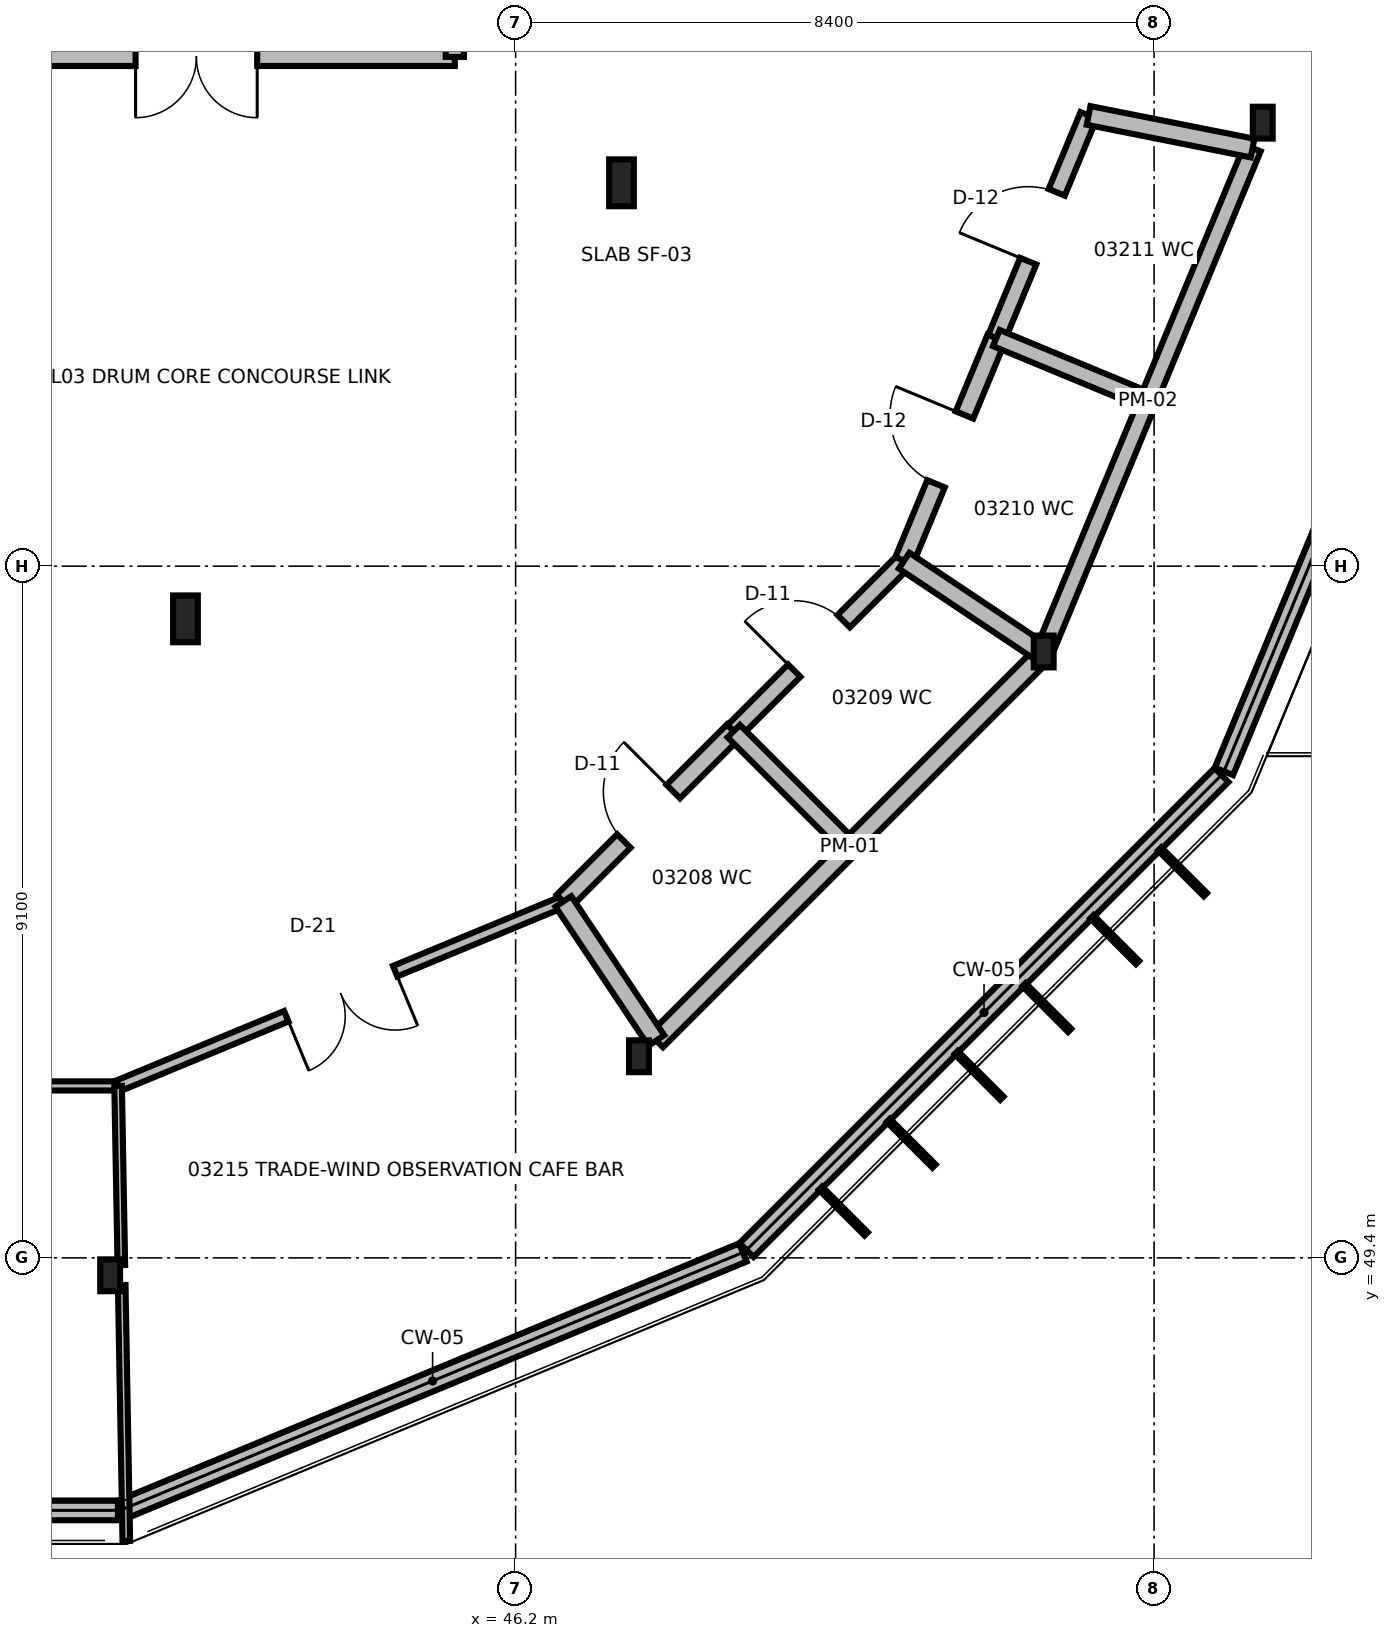
"""IFC4 building model, lengths in metres.
Left out: names, types, materials, properties, quantities, classifications, styles, units other than length and angle.
Written with IfcOpenShell. Run it as: python <this file> out.ifc"""

import sys

from ifc_helpers import new_model, si_unit, direction, frame, frame_2d, origin, origin_2d, place, context, subcontext, project, spatial, rectangle, i_section, extrude, element, fill, save


model = new_model("IFC4")
c1 = context("Model", 3, precision=1e-05, world=origin(), true_north=direction((0.0, 1.0)))
c2 = subcontext(c1, "Body", "Model", "MODEL_VIEW")
j1 = project(units=[si_unit("LENGTHUNIT", "METRE"), si_unit("PLANEANGLEUNIT", "RADIAN")], contexts=[c1])
p1 = place(None, origin())
s1 = spatial("IfcSite", under=j1, at=p1, CompositionType="ELEMENT")
p2 = place(p1, origin())
s2 = spatial("IfcBuilding", under=s1, at=p2, CompositionType="ELEMENT")
p3 = place(p2, frame((0.0, 0.0, 13.8)))
s3 = spatial("IfcBuildingStorey", under=s2, at=p3, CompositionType="ELEMENT", Elevation=13.8)
for number, where, z_axis, x_axis in (
    (1, (41.856, 57.807, 0.0), (0.0, 0.0, 1.0), (1.0, 0.0, 0.0)),
    (2, (47.593, 63.544, 0.0), (0.0, 0.0, 1.0), (1.0, 0.0, 0.0)),
):
    element("IfcColumn", number, at=place(p3, frame(where, z_axis=z_axis, x_axis=x_axis)), inside=s3, PredefinedType="COLUMN", context=c2, shape_type="SweptSolid", body=[
        extrude(i_section(OverallWidth=0.325, OverallDepth=0.616, WebThickness=0.014, FlangeThickness=0.021, at=origin_2d()), origin(), (0.0, 0.0, 1.0), 3.9),
    ])
for number, where, z_axis, x_axis in (
    (3, (40.865, 49.171, 0.0), (0.0, 0.0, 1.0), (1.0, 0.0, 0.0)),
    (4, (47.823, 52.052, 0.0), (0.0, 0.0, 1.0), (1.0, 0.0, 0.0)),
    (5, (53.147, 57.377, 0.0), (0.0, 0.0, 1.0), (1.0, 0.0, 0.0)),
    (6, (56.029, 64.335, 0.0), (0.0, 0.0, 1.0), (1.0, 0.0, 0.0)),
):
    element("IfcColumn", number, at=place(p3, frame(where, z_axis=z_axis, x_axis=x_axis)), inside=s3, PredefinedType="COLUMN", context=c2, shape_type="SweptSolid", body=[
        extrude(i_section(OverallWidth=0.261, OverallDepth=0.419, WebThickness=0.012, FlangeThickness=0.019, at=origin_2d()), origin(), (0.0, 0.0, 1.0), 3.9),
    ])
p4 = place(p2, frame((0.0, 0.0, 9.6)))
s4 = spatial("IfcBuildingStorey", under=s2, at=p4, CompositionType="ELEMENT", Elevation=9.6)
for number, where, z_axis, x_axis in (
    (7, (46.2, 49.4, 0.0), (0.0, 0.0, 1.0), (1.0, 0.0, 0.0)),
    (8, (54.6, 49.4, 0.0), (0.0, 0.0, 1.0), (1.0, 0.0, 0.0)),
):
    element("IfcColumn", number, at=place(p4, frame(where, z_axis=z_axis, x_axis=x_axis)), inside=s4, PredefinedType="COLUMN", context=c2, shape_type="SweptSolid", body=[
        extrude(i_section(OverallWidth=0.261, OverallDepth=0.419, WebThickness=0.012, FlangeThickness=0.019, at=origin_2d()), origin(), (0.0, 0.0, 1.0), 5.977),
    ])
p5 = place(p3, frame((32.132, 46.078, 0.0), z_axis=(0.0, 0.0, 1.0), x_axis=(1.0, 0.0, 0.0)))
e9 = element("IfcWall", 9, at=p5, inside=s3, PredefinedType="SOLIDWALL", context=c2, shape_type="SweptSolid", body=[
    extrude(rectangle(XDim=8.836, YDim=0.26, at=frame_2d((4.418, 0.0))), origin(), (0.0, 0.0, 1.0), 1.48),
])
p6 = place(p3, frame((41.026, 46.09, 0.0), z_axis=(0.0, 0.0, 1.0), x_axis=(0.923880107749, 0.382682043614, 0.0)))
e10 = element("IfcWall", 10, at=p6, inside=s3, PredefinedType="SOLIDWALL", context=c2, shape_type="SweptSolid", body=[
    extrude(rectangle(XDim=8.836, YDim=0.26, at=frame_2d((4.418, 0.0))), origin(), (0.0, 0.0, 1.0), 1.48),
])
p7 = place(p3, frame((49.238, 49.504, 0.0), z_axis=(0.0, 0.0, 1.0), x_axis=(0.707106781187, 0.707106781187, 0.0)))
e11 = element("IfcWall", 11, at=p7, inside=s3, PredefinedType="SOLIDWALL", context=c2, shape_type="SweptSolid", body=[
    extrude(rectangle(XDim=8.836, YDim=0.26, at=frame_2d((4.418, 0.0))), origin(), (0.0, 0.0, 1.0), 1.48),
])
p8 = place(p3, frame((55.519, 55.801, 0.0), z_axis=(0.0, 0.0, 1.0), x_axis=(0.382682043614, 0.923880107749, 0.0)))
e12 = element("IfcWall", 12, at=p8, inside=s3, PredefinedType="SOLIDWALL", context=c2, shape_type="SweptSolid", body=[
    extrude(rectangle(XDim=8.836, YDim=0.26, at=frame_2d((4.418, 0.0))), origin(), (0.0, 0.0, 1.0), 1.48),
])
p9 = place(p3, frame((38.6, 65.2, 0.0), z_axis=(0.0, 0.0, 1.0), x_axis=(1.0, 0.0, 0.0)))
e13 = element("IfcWall", 13, at=p9, inside=s3, PredefinedType="SOLIDWALL", context=c2, shape_type="SweptSolid", body=[
    extrude(rectangle(XDim=6.8, YDim=0.24, at=frame_2d((3.4, 0.0))), origin(), (0.0, 0.0, 1.0), 3.64),
])
p10 = place(p9, frame((2.6, 0.0, 0.0)))
e14 = element("IfcOpeningElement", 14, at=p10, cuts=e13, PredefinedType="OPENING", context=c2, shape_type="SweptSolid", body=[
    extrude(rectangle(XDim=1.6, YDim=2.2, at=frame_2d((0.8, 1.1))), frame((0.0, 0.13, 0.0), z_axis=(0.0, -1.0, 0.0), x_axis=(1.0, 0.0, 0.0)), (0.0, 0.0, 1.0), 0.26),
])
p11 = place(p3, frame((45.4, 65.2, 0.0), z_axis=(0.0, 0.0, 1.0), x_axis=(0.0, 1.0, 0.0)))
e15 = element("IfcWall", 15, at=p11, inside=s3, PredefinedType="SOLIDWALL", context=c2, shape_type="SweptSolid", body=[
    extrude(rectangle(XDim=3.2, YDim=0.24, at=frame_2d((1.6, 0.0))), origin(), (0.0, 0.0, 1.0), 3.64),
])
p12 = place(p3, frame((34.63, 51.662, 0.0), z_axis=(0.0, 0.0, 1.0), x_axis=(1.0, 0.0, 0.0)))
e16 = element("IfcWall", 16, at=p12, inside=s3, PredefinedType="PARTITIONING", context=c2, shape_type="SweptSolid", body=[
    extrude(rectangle(XDim=6.34, YDim=0.12, at=frame_2d((3.17, 0.0))), origin(), (0.0, 0.0, 1.0), 3.004),
])
p13 = place(p3, frame((40.97, 51.662, 0.0), z_axis=(0.0, 0.0, 1.0), x_axis=(0.923868995071, 0.382708871005, 0.0)))
e17 = element("IfcWall", 17, at=p13, inside=s3, PredefinedType="PARTITIONING", context=c2, shape_type="SweptSolid", body=[
    extrude(rectangle(XDim=6.34, YDim=0.15, at=frame_2d((3.17, 0.0))), origin(), (0.0, 0.0, 1.0), 3.004),
])
p14 = place(p13, frame((2.395, 0.0, 0.0)))
e18 = element("IfcOpeningElement", 18, at=p14, cuts=e17, PredefinedType="OPENING", context=c2, shape_type="SweptSolid", body=[
    extrude(rectangle(XDim=1.55, YDim=2.3, at=frame_2d((0.775, 1.15))), frame((0.0, 0.085, 0.0), z_axis=(0.0, -1.0, 0.0), x_axis=(1.0, 0.0, 0.0)), (0.0, 0.0, 1.0), 0.17),
])
p15 = place(p3, frame((46.828, 54.089, 0.0), z_axis=(0.0, 0.0, 1.0), x_axis=(0.707106781187, 0.707106781187, 0.0)))
e19 = element("IfcWall", 19, at=p15, inside=s3, PredefinedType="PLUMBINGWALL", context=c2, shape_type="SweptSolid", body=[
    extrude(rectangle(XDim=3.17, YDim=0.25, at=frame_2d((1.585, 0.0))), origin(), (0.0, 0.0, 1.0), 3.004),
])
p16 = place(p15, frame((1.125, 0.0, 0.0)))
e20 = element("IfcOpeningElement", 20, at=p16, cuts=e19, PredefinedType="OPENING", context=c2, shape_type="SweptSolid", body=[
    extrude(rectangle(XDim=0.92, YDim=2.1, at=frame_2d((0.46, 1.05))), frame((0.0, 0.135, 0.0), z_axis=(0.0, -1.0, 0.0), x_axis=(1.0, 0.0, 0.0)), (0.0, 0.0, 1.0), 0.27),
])
p17 = place(p3, frame((49.07, 56.33, 0.0), z_axis=(0.0, 0.0, 1.0), x_axis=(0.707106781187, 0.707106781187, 0.0)))
e21 = element("IfcWall", 21, at=p17, inside=s3, PredefinedType="PLUMBINGWALL", context=c2, shape_type="SweptSolid", body=[
    extrude(rectangle(XDim=3.17, YDim=0.23, at=frame_2d((1.585, 0.0))), origin(), (0.0, 0.0, 1.0), 3.64),
])
p18 = place(p17, frame((1.125, 0.0, 0.0)))
e22 = element("IfcOpeningElement", 22, at=p18, cuts=e21, PredefinedType="OPENING", context=c2, shape_type="SweptSolid", body=[
    extrude(rectangle(XDim=0.92, YDim=2.1, at=frame_2d((0.46, 1.05))), frame((0.0, 0.125, 0.0), z_axis=(0.0, -1.0, 0.0), x_axis=(1.0, 0.0, 0.0)), (0.0, 0.0, 1.0), 0.25),
])
p19 = place(p3, frame((48.05, 52.26, 0.0), z_axis=(0.0, 0.0, 1.0), x_axis=(0.707123738387, 0.707089823579, 0.0)))
e23 = element("IfcWall", 23, at=p19, inside=s3, PredefinedType="PLUMBINGWALL", context=c2, shape_type="SweptSolid", body=[
    extrude(rectangle(XDim=7.199, YDim=0.25, at=frame_2d((3.599, 0.0))), origin(), (0.0, 0.0, 1.0), 3.144),
])
p20 = place(p3, frame((49.07, 56.33, 0.0), z_axis=(0.0, 0.0, 1.0), x_axis=(0.707106781187, -0.707106781187, 0.0)))
e24 = element("IfcWall", 24, at=p20, inside=s3, PredefinedType="PLUMBINGWALL", context=c2, shape_type="SweptSolid", body=[
    extrude(rectangle(XDim=2.158, YDim=0.23, at=frame_2d((1.079, 0.0))), origin(), (0.0, 0.0, 1.0), 3.144),
])
p21 = place(p3, frame((46.828, 54.089, 0.0), z_axis=(0.0, 0.0, 1.0), x_axis=(0.555647384729, -0.831418056, 0.0)))
e25 = element("IfcWall", 25, at=p21, inside=s3, PredefinedType="PLUMBINGWALL", context=c2, shape_type="SweptSolid", body=[
    extrude(rectangle(XDim=2.2, YDim=0.25, at=frame_2d((1.1, 0.0))), origin(), (0.0, 0.0, 1.0), 3.004),
])
p22 = place(p3, frame((51.311, 58.572, 0.0), z_axis=(0.0, 0.0, 1.0), x_axis=(0.38272812134, 0.923861020466, 0.0)))
e26 = element("IfcWall", 26, at=p22, inside=s3, PredefinedType="PLUMBINGWALL", context=c2, shape_type="SweptSolid", body=[
    extrude(rectangle(XDim=3.17, YDim=0.25, at=frame_2d((1.585, 0.0))), origin(), (0.0, 0.0, 1.0), 3.004),
])
p23 = place(p22, frame((1.095, 0.0, 0.0)))
e27 = element("IfcOpeningElement", 27, at=p23, cuts=e26, PredefinedType="OPENING", context=c2, shape_type="SweptSolid", body=[
    extrude(rectangle(XDim=0.98, YDim=2.15, at=frame_2d((0.49, 1.075))), frame((0.0, 0.135, 0.0), z_axis=(0.0, -1.0, 0.0), x_axis=(1.0, 0.0, 0.0)), (0.0, 0.0, 1.0), 0.27),
])
p24 = place(p3, frame((52.525, 61.501, 0.0), z_axis=(0.0, 0.0, 1.0), x_axis=(0.382689618566, 0.923876970079, 0.0)))
e28 = element("IfcWall", 28, at=p24, inside=s3, PredefinedType="PLUMBINGWALL", context=c2, shape_type="SweptSolid", body=[
    extrude(rectangle(XDim=3.17, YDim=0.23, at=frame_2d((1.585, 0.0))), origin(), (0.0, 0.0, 1.0), 3.64),
])
p25 = place(p24, frame((1.095, 0.0, 0.0)))
e29 = element("IfcOpeningElement", 29, at=p25, cuts=e28, PredefinedType="OPENING", context=c2, shape_type="SweptSolid", body=[
    extrude(rectangle(XDim=0.98, YDim=2.15, at=frame_2d((0.49, 1.075))), frame((0.0, 0.125, 0.0), z_axis=(0.0, -1.0, 0.0), x_axis=(1.0, 0.0, 0.0)), (0.0, 0.0, 1.0), 0.25),
])
p26 = place(p3, frame((53.141, 57.35, 0.0), z_axis=(0.0, 0.0, 1.0), x_axis=(0.382683262556, 0.923879602849, 0.0)))
e30 = element("IfcWall", 30, at=p26, inside=s3, PredefinedType="PLUMBINGWALL", context=c2, shape_type="SweptSolid", body=[
    extrude(rectangle(XDim=7.199, YDim=0.23, at=frame_2d((3.6, 0.0))), origin(), (0.0, 0.0, 1.0), 2.67),
])
p27 = place(p3, frame((52.525, 61.501, 0.0), z_axis=(0.0, 0.0, 1.0), x_axis=(0.923881682241, -0.382678242417, 0.0)))
e31 = element("IfcWall", 31, at=p27, inside=s3, PredefinedType="PLUMBINGWALL", context=c2, shape_type="SweptSolid", body=[
    extrude(rectangle(XDim=2.158, YDim=0.23, at=frame_2d((1.079, 0.0))), origin(), (0.0, 0.0, 1.0), 3.144),
])
p28 = place(p3, frame((51.311, 58.572, 0.0), z_axis=(0.0, 0.0, 1.0), x_axis=(0.831452313852, -0.555596121107, 0.0)))
e32 = element("IfcWall", 32, at=p28, inside=s3, PredefinedType="PLUMBINGWALL", context=c2, shape_type="SweptSolid", body=[
    extrude(rectangle(XDim=2.2, YDim=0.25, at=frame_2d((1.1, 0.0))), origin(), (0.0, 0.0, 1.0), 2.67),
])
p29 = place(p3, frame((53.738, 64.43, 0.0), z_axis=(0.0, 0.0, 1.0), x_axis=(0.98078501504, -0.195091656081, 0.0)))
e33 = element("IfcWall", 33, at=p29, inside=s3, PredefinedType="PLUMBINGWALL", context=c2, shape_type="SweptSolid", body=[
    extrude(rectangle(XDim=2.2, YDim=0.25, at=frame_2d((1.1, 0.0))), origin(), (0.0, 0.0, 1.0), 3.004),
])
p30 = place(p3, frame((40.97, 51.662, 0.0), z_axis=(0.0, 0.0, 1.0), x_axis=(0.018016959048, -0.99983768142, 0.0)))
e34 = element("IfcWall", 34, at=p30, inside=s3, PredefinedType="PARTITIONING", context=c2, shape_type="SweptSolid", body=[
    extrude(rectangle(XDim=2.358, YDim=0.1, at=frame_2d((1.179, 0.0))), origin(), (0.0, 0.0, 1.0), 3.004),
])
p31 = place(p3, frame((41.017, 49.042, 0.0), z_axis=(0.0, 0.0, 1.0), x_axis=(0.017985050226, -0.999838255904, 0.0)))
e35 = element("IfcWall", 35, at=p31, inside=s3, PredefinedType="PARTITIONING", context=c2, shape_type="SweptSolid", body=[
    extrude(rectangle(XDim=3.366, YDim=0.1, at=frame_2d((1.683, 0.0))), origin(), (0.0, 0.0, 1.0), 2.67),
])
p32 = place(p10, frame((1.6, 0.0, 0.0), z_axis=(0.0, 0.0, 1.0), x_axis=(-1.0, 0.0, 0.0)))
e36 = element("IfcDoor", 36, at=p32, inside=s3, OperationType="DOUBLE_DOOR_SINGLE_SWING", PredefinedType="DOOR", context=c2, shape_type="SweptSolid", body=[
    extrude(rectangle(XDim=1.6, YDim=2.2, at=frame_2d((0.8, 1.1))), frame((0.0, 0.025, 0.0), z_axis=(0.0, -1.0, 0.0), x_axis=(1.0, 0.0, 0.0)), (0.0, 0.0, 1.0), 0.05),
])
fill(e14, e36)
p33 = place(p14, frame((1.55, 0.0, 0.0), z_axis=(0.0, 0.0, 1.0), x_axis=(-1.0, 0.0, 0.0)))
e37 = element("IfcDoor", 37, at=p33, inside=s3, OperationType="DOUBLE_DOOR_SINGLE_SWING", PredefinedType="DOOR", context=c2, shape_type="SweptSolid", body=[
    extrude(rectangle(XDim=1.55, YDim=2.3, at=frame_2d((0.775, 1.15))), frame((0.0, 0.025, 0.0), z_axis=(0.0, -1.0, 0.0), x_axis=(1.0, 0.0, 0.0)), (0.0, 0.0, 1.0), 0.05),
])
fill(e18, e37)
p34 = place(p16, frame((0.92, 0.0, 0.0), z_axis=(0.0, 0.0, 1.0), x_axis=(-1.0, 0.0, 0.0)))
e38 = element("IfcDoor", 38, at=p34, inside=s3, OperationType="SINGLE_SWING_LEFT", PredefinedType="DOOR", context=c2, shape_type="SweptSolid", body=[
    extrude(rectangle(XDim=0.92, YDim=2.1, at=frame_2d((0.46, 1.05))), frame((0.0, 0.025, 0.0), z_axis=(0.0, -1.0, 0.0), x_axis=(1.0, 0.0, 0.0)), (0.0, 0.0, 1.0), 0.05),
])
fill(e20, e38)
p35 = place(p18, frame((0.92, 0.0, 0.0), z_axis=(0.0, 0.0, 1.0), x_axis=(-1.0, 0.0, 0.0)))
e39 = element("IfcDoor", 39, at=p35, inside=s3, OperationType="SINGLE_SWING_RIGHT", PredefinedType="DOOR", context=c2, shape_type="SweptSolid", body=[
    extrude(rectangle(XDim=0.92, YDim=2.1, at=frame_2d((0.46, 1.05))), frame((0.0, 0.025, 0.0), z_axis=(0.0, -1.0, 0.0), x_axis=(1.0, 0.0, 0.0)), (0.0, 0.0, 1.0), 0.05),
])
fill(e22, e39)
p36 = place(p23, frame((0.98, 0.0, 0.0), z_axis=(0.0, 0.0, 1.0), x_axis=(-1.0, 0.0, 0.0)))
e40 = element("IfcDoor", 40, at=p36, inside=s3, OperationType="SINGLE_SWING_LEFT", PredefinedType="DOOR", context=c2, shape_type="SweptSolid", body=[
    extrude(rectangle(XDim=0.98, YDim=2.15, at=frame_2d((0.49, 1.075))), frame((0.0, 0.025, 0.0), z_axis=(0.0, -1.0, 0.0), x_axis=(1.0, 0.0, 0.0)), (0.0, 0.0, 1.0), 0.05),
])
fill(e27, e40)
p37 = place(p25, frame((0.98, 0.0, 0.0), z_axis=(0.0, 0.0, 1.0), x_axis=(-1.0, 0.0, 0.0)))
e41 = element("IfcDoor", 41, at=p37, inside=s3, OperationType="SINGLE_SWING_RIGHT", PredefinedType="DOOR", context=c2, shape_type="SweptSolid", body=[
    extrude(rectangle(XDim=0.98, YDim=2.15, at=frame_2d((0.49, 1.075))), frame((0.0, 0.025, 0.0), z_axis=(0.0, -1.0, 0.0), x_axis=(1.0, 0.0, 0.0)), (0.0, 0.0, 1.0), 0.05),
])
fill(e29, e41)
save(model, sys.argv[1])
